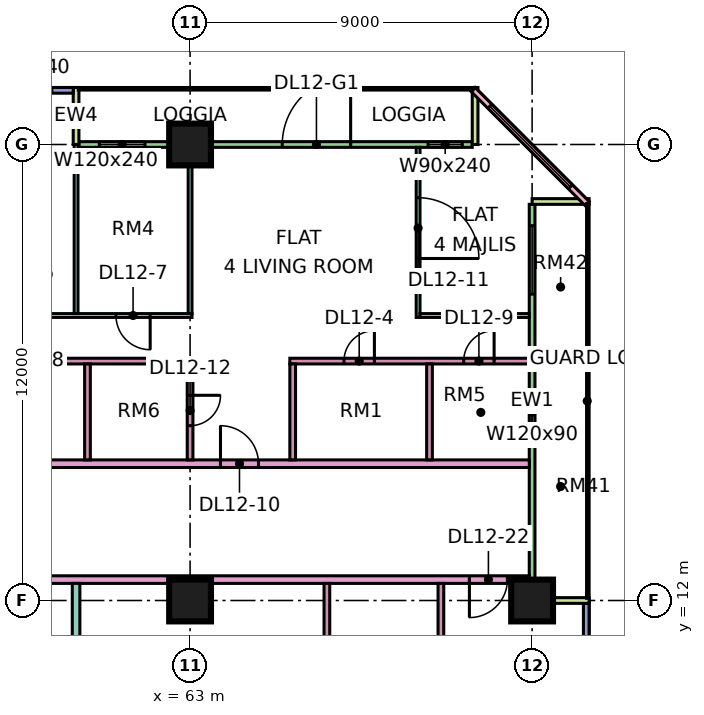
"""IFC4 building model, lengths in metres.
Left out: names, types, materials, properties, quantities, classifications, styles, units other than length and angle.
Written with IfcOpenShell. Run it as: python <this file> out.ifc"""

import sys

from ifc_helpers import new_model, si_unit, direction, frame, frame_2d, origin, origin_2d, place, context, subcontext, project, spatial, rectangle, extrude, element, fill, save


model = new_model("IFC4")
c1 = context("Model", 3, precision=1e-05, world=origin(), true_north=direction((0.0, 1.0)))
c2 = subcontext(c1, "Body", "Model", "MODEL_VIEW")
j1 = project(units=[si_unit("LENGTHUNIT", "METRE"), si_unit("PLANEANGLEUNIT", "RADIAN")], contexts=[c1])
p1 = place(None, origin())
s1 = spatial("IfcSite", under=j1, at=p1, CompositionType="ELEMENT")
p2 = place(p1, origin())
s2 = spatial("IfcBuilding", under=s1, at=p2, CompositionType="ELEMENT")
p3 = place(p2, frame((0.0, 0.0, 60.15)))
s3 = spatial("IfcBuildingStorey", under=s2, at=p3, CompositionType="ELEMENT", Elevation=60.15)
for number, where, z_axis, x_axis in (
    (1, (63.0, 12.0, 0.0), (0.0, 0.0, 1.0), (1.0, 0.0, 0.0)),
    (2, (63.0, 24.0, 0.0), (0.0, 0.0, 1.0), (1.0, 0.0, 0.0)),
    (3, (72.0, 12.0, 0.0), (0.0, 0.0, 1.0), (1.0, 0.0, 0.0)),
):
    element("IfcColumn", number, at=place(p3, frame(where, z_axis=z_axis, x_axis=x_axis)), inside=s3, PredefinedType="COLUMN", context=c2, shape_type="SweptSolid", body=[
        extrude(rectangle(XDim=1.1, YDim=1.1, at=origin_2d()), origin(), (0.0, 0.0, 1.0), 3.75),
    ])
p4 = place(p3, frame((70.425, 24.0, 0.0), z_axis=(0.0, 0.0, 1.0), x_axis=(-1.0, 0.0, 0.0)))
e4 = element("IfcWall", 4, at=p4, inside=s3, PredefinedType="SOLIDWALL", context=c2, shape_type="SweptSolid", body=[
    extrude(rectangle(XDim=10.35, YDim=0.15, at=frame_2d((5.175, 0.0))), origin(), (0.0, 0.0, 1.0), 3.35),
])
p5 = place(p4, frame((0.262, 0.0, 0.45)))
e5 = element("IfcOpeningElement", 5, at=p5, cuts=e4, PredefinedType="OPENING", context=c2, shape_type="SweptSolid", body=[
    extrude(rectangle(XDim=0.9, YDim=2.4, at=frame_2d((0.45, 1.2))), frame((0.0, 0.085, 0.0), z_axis=(0.0, -1.0, 0.0), x_axis=(1.0, 0.0, 0.0)), (0.0, 0.0, 1.0), 0.17),
])
p6 = place(p4, frame((3.2, 0.0, 0.0)))
e6 = element("IfcOpeningElement", 6, at=p6, cuts=e4, PredefinedType="OPENING", context=c2, shape_type="SweptSolid", body=[
    extrude(rectangle(XDim=1.8, YDim=2.4, at=frame_2d((0.9, 1.2))), frame((0.0, 0.085, 0.0), z_axis=(0.0, -1.0, 0.0), x_axis=(1.0, 0.0, 0.0)), (0.0, 0.0, 1.0), 0.17),
])
p7 = place(p4, frame((8.613, 0.0, 0.45)))
e7 = element("IfcOpeningElement", 7, at=p7, cuts=e4, PredefinedType="OPENING", context=c2, shape_type="SweptSolid", body=[
    extrude(rectangle(XDim=1.2, YDim=2.4, at=frame_2d((0.6, 1.2))), frame((0.0, 0.085, 0.0), z_axis=(0.0, -1.0, 0.0), x_axis=(1.0, 0.0, 0.0)), (0.0, 0.0, 1.0), 0.17),
])
for number, where, z_axis, x_axis in (
    (8, (70.5, 25.5, 0.0), (0.0, 0.0, 1.0), (0.0, -1.0, 0.0)),
    (9, (60.0, 25.5, 0.0), (0.0, 0.0, 1.0), (0.0, -1.0, 0.0)),
):
    element("IfcWall", number, at=place(p3, frame(where, z_axis=z_axis, x_axis=x_axis)), inside=s3, PredefinedType="SOLIDWALL", context=c2, shape_type="SweptSolid", body=[
        extrude(rectangle(XDim=1.5, YDim=0.15, at=frame_2d((0.75, 0.0))), origin(), (0.0, 0.0, 1.0), 3.35),
    ])
p8 = place(p3, frame((59.925, 25.425, 0.0), z_axis=(0.0, 0.0, 1.0), x_axis=(-1.0, 0.0, 0.0)))
e10 = element("IfcWall", 10, at=p8, inside=s3, PredefinedType="SOLIDWALL", context=c2, shape_type="SweptSolid", body=[
    extrude(rectangle(XDim=11.85, YDim=0.15, at=frame_2d((5.925, 0.0))), origin(), (0.0, 0.0, 1.0), 3.35),
])
p9 = place(p8, frame((0.562, 0.0, 0.45)))
e11 = element("IfcOpeningElement", 11, at=p9, cuts=e10, PredefinedType="OPENING", context=c2, shape_type="SweptSolid", body=[
    extrude(rectangle(XDim=1.8, YDim=2.4, at=frame_2d((0.9, 1.2))), frame((0.0, 0.085, 0.0), z_axis=(0.0, -1.0, 0.0), x_axis=(1.0, 0.0, 0.0)), (0.0, 0.0, 1.0), 0.17),
])
p10 = place(p8, frame((3.525, 0.0, 0.45)))
e12 = element("IfcOpeningElement", 12, at=p10, cuts=e10, PredefinedType="OPENING", context=c2, shape_type="SweptSolid", body=[
    extrude(rectangle(XDim=1.8, YDim=2.4, at=frame_2d((0.9, 1.2))), frame((0.0, 0.085, 0.0), z_axis=(0.0, -1.0, 0.0), x_axis=(1.0, 0.0, 0.0)), (0.0, 0.0, 1.0), 0.17),
])
p11 = place(p8, frame((6.488, 0.0, 0.45)))
e13 = element("IfcOpeningElement", 13, at=p11, cuts=e10, PredefinedType="OPENING", context=c2, shape_type="SweptSolid", body=[
    extrude(rectangle(XDim=4.8, YDim=2.4, at=frame_2d((2.4, 1.2))), frame((0.0, 0.085, 0.0), z_axis=(0.0, -1.0, 0.0), x_axis=(1.0, 0.0, 0.0)), (0.0, 0.0, 1.0), 0.17),
])
p12 = place(p3, frame((73.425, 1.5, 0.0), z_axis=(0.0, 0.0, 1.0), x_axis=(0.0, 1.0, 0.0)))
e14 = element("IfcWall", 14, at=p12, inside=s3, PredefinedType="SOLIDWALL", context=c2, shape_type="SweptSolid", body=[
    extrude(rectangle(XDim=10.425, YDim=0.15, at=frame_2d((5.212, 0.0))), origin(), (0.0, 0.0, 1.0), 3.35),
])
p13 = place(p12, frame((1.025, 0.0, 0.45)))
e15 = element("IfcOpeningElement", 15, at=p13, cuts=e14, PredefinedType="OPENING", context=c2, shape_type="SweptSolid", body=[
    extrude(rectangle(XDim=3.0, YDim=2.4, at=frame_2d((1.5, 1.2))), frame((0.0, 0.085, 0.0), z_axis=(0.0, -1.0, 0.0), x_axis=(1.0, 0.0, 0.0)), (0.0, 0.0, 1.0), 0.17),
])
p14 = place(p12, frame((6.238, 0.0, 0.45)))
e16 = element("IfcOpeningElement", 16, at=p14, cuts=e14, PredefinedType="OPENING", context=c2, shape_type="SweptSolid", body=[
    extrude(rectangle(XDim=3.0, YDim=2.4, at=frame_2d((1.5, 1.2))), frame((0.0, 0.085, 0.0), z_axis=(0.0, -1.0, 0.0), x_axis=(1.0, 0.0, 0.0)), (0.0, 0.0, 1.0), 0.17),
])
p15 = place(p3, frame((72.0, 12.075, 0.0), z_axis=(0.0, 0.0, 1.0), x_axis=(0.0, 1.0, 0.0)))
e17 = element("IfcWall", 17, at=p15, inside=s3, PredefinedType="SOLIDWALL", context=c2, shape_type="SweptSolid", body=[
    extrude(rectangle(XDim=10.35, YDim=0.15, at=frame_2d((5.175, 0.0))), origin(), (0.0, 0.0, 1.0), 3.35),
])
p16 = place(p15, frame((4.275, 0.0, 1.7)))
e18 = element("IfcOpeningElement", 18, at=p16, cuts=e17, PredefinedType="OPENING", context=c2, shape_type="SweptSolid", body=[
    extrude(rectangle(XDim=1.2, YDim=0.9, at=frame_2d((0.6, 0.45))), frame((0.0, 0.085, 0.0), z_axis=(0.0, -1.0, 0.0), x_axis=(1.0, 0.0, 0.0)), (0.0, 0.0, 1.0), 0.17),
])
p17 = place(p15, frame((7.988, 0.0, 0.45)))
e19 = element("IfcOpeningElement", 19, at=p17, cuts=e17, PredefinedType="OPENING", context=c2, shape_type="SweptSolid", body=[
    extrude(rectangle(XDim=1.8, YDim=2.4, at=frame_2d((0.9, 1.2))), frame((0.0, 0.085, 0.0), z_axis=(0.0, -1.0, 0.0), x_axis=(1.0, 0.0, 0.0)), (0.0, 0.0, 1.0), 0.17),
])
for number, where, z_axis, x_axis in (
    (20, (73.5, 12.0, 0.0), (0.0, 0.0, 1.0), (-1.0, 0.0, 0.0)),
    (21, (73.5, 22.5, 0.0), (0.0, 0.0, 1.0), (-1.0, 0.0, 0.0)),
):
    element("IfcWall", number, at=place(p3, frame(where, z_axis=z_axis, x_axis=x_axis)), inside=s3, PredefinedType="SOLIDWALL", context=c2, shape_type="SweptSolid", body=[
        extrude(rectangle(XDim=1.5, YDim=0.15, at=frame_2d((0.75, 0.0))), origin(), (0.0, 0.0, 1.0), 3.35),
    ])
p18 = place(p3, frame((73.447, 22.447, 0.0), z_axis=(0.0, 0.0, 1.0), x_axis=(-0.707106781187, 0.707106781187, 0.0)))
e22 = element("IfcWall", 22, at=p18, inside=s3, PredefinedType="SOLIDWALL", context=c2, shape_type="SweptSolid", body=[
    extrude(rectangle(XDim=4.243, YDim=0.15, at=frame_2d((2.121, 0.0))), origin(), (0.0, 0.0, 1.0), 3.35),
])
p19 = place(p18, frame((0.621, 0.0, 0.45)))
e23 = element("IfcOpeningElement", 23, at=p19, cuts=e22, PredefinedType="OPENING", context=c2, shape_type="SweptSolid", body=[
    extrude(rectangle(XDim=3.0, YDim=2.4, at=frame_2d((1.5, 1.2))), frame((0.0, 0.085, 0.0), z_axis=(0.0, -1.0, 0.0), x_axis=(1.0, 0.0, 0.0)), (0.0, 0.0, 1.0), 0.17),
])
p20 = place(p3, frame((40.65, 12.55, 0.0), z_axis=(0.0, 0.0, 1.0), x_axis=(1.0, 0.0, 0.0)))
e24 = element("IfcWall", 24, at=p20, inside=s3, PredefinedType="PARTITIONING", context=c2, shape_type="SweptSolid", body=[
    extrude(rectangle(XDim=31.276, YDim=0.2, at=frame_2d((15.638, 0.0))), origin(), (0.0, 0.0, 1.0), 3.35),
])
p21 = place(p20, frame((8.4, 0.0, 0.0)))
e25 = element("IfcOpeningElement", 25, at=p21, cuts=e24, PredefinedType="OPENING", context=c2, shape_type="SweptSolid", body=[
    extrude(rectangle(XDim=1.0, YDim=2.1, at=frame_2d((0.5, 1.05))), frame((0.0, 0.11, 0.0), z_axis=(0.0, -1.0, 0.0), x_axis=(1.0, 0.0, 0.0)), (0.0, 0.0, 1.0), 0.22),
])
p22 = place(p20, frame((29.7, 0.0, 0.0)))
e26 = element("IfcOpeningElement", 26, at=p22, cuts=e24, PredefinedType="OPENING", context=c2, shape_type="SweptSolid", body=[
    extrude(rectangle(XDim=1.0, YDim=2.1, at=frame_2d((0.5, 1.05))), frame((0.0, 0.11, 0.0), z_axis=(0.0, -1.0, 0.0), x_axis=(1.0, 0.0, 0.0)), (0.0, 0.0, 1.0), 0.22),
])
p23 = place(p20, frame((1.05, 0.0, 0.0)))
e27 = element("IfcOpeningElement", 27, at=p23, cuts=e24, PredefinedType="OPENING", context=c2, shape_type="SweptSolid", body=[
    extrude(rectangle(XDim=1.0, YDim=2.1, at=frame_2d((0.5, 1.05))), frame((0.0, 0.11, 0.0), z_axis=(0.0, -1.0, 0.0), x_axis=(1.0, 0.0, 0.0)), (0.0, 0.0, 1.0), 0.22),
])
p24 = place(p3, frame((51.225, 15.6, 0.0), z_axis=(0.0, 0.0, 1.0), x_axis=(1.0, 0.0, 0.0)))
e28 = element("IfcWall", 28, at=p24, inside=s3, PredefinedType="PARTITIONING", context=c2, shape_type="SweptSolid", body=[
    extrude(rectangle(XDim=20.701, YDim=0.2, at=frame_2d((10.351, 0.0))), origin(), (0.0, 0.0, 1.0), 3.35),
])
p25 = place(p24, frame((12.575, 0.0, 0.0)))
e29 = element("IfcOpeningElement", 29, at=p25, cuts=e28, PredefinedType="OPENING", context=c2, shape_type="SweptSolid", body=[
    extrude(rectangle(XDim=1.0, YDim=2.1, at=frame_2d((0.5, 1.05))), frame((0.0, 0.11, 0.0), z_axis=(0.0, -1.0, 0.0), x_axis=(1.0, 0.0, 0.0)), (0.0, 0.0, 1.0), 0.22),
])
p26 = place(p24, frame((0.875, 0.0, 0.0)))
e30 = element("IfcOpeningElement", 30, at=p26, cuts=e28, PredefinedType="OPENING", context=c2, shape_type="SweptSolid", body=[
    extrude(rectangle(XDim=1.0, YDim=2.1, at=frame_2d((0.5, 1.05))), frame((0.0, 0.11, 0.0), z_axis=(0.0, -1.0, 0.0), x_axis=(1.0, 0.0, 0.0)), (0.0, 0.0, 1.0), 0.22),
])
p27 = place(p3, frame((54.1, 18.3, 0.0), z_axis=(0.0, 0.0, 1.0), x_axis=(1.0, 0.0, 0.0)))
e31 = element("IfcWall", 31, at=p27, inside=s3, PredefinedType="PARTITIONING", context=c2, shape_type="SweptSolid", body=[
    extrude(rectangle(XDim=8.975, YDim=0.15, at=frame_2d((4.487, 0.0))), origin(), (0.0, 0.0, 1.0), 3.35),
])
p28 = place(p27, frame((2.6, 0.0, 0.0)))
e32 = element("IfcOpeningElement", 32, at=p28, cuts=e31, PredefinedType="OPENING", context=c2, shape_type="SweptSolid", body=[
    extrude(rectangle(XDim=0.9, YDim=2.1, at=frame_2d((0.45, 1.05))), frame((0.0, 0.085, 0.0), z_axis=(0.0, -1.0, 0.0), x_axis=(1.0, 0.0, 0.0)), (0.0, 0.0, 1.0), 0.17),
])
p29 = place(p3, frame((54.1, 19.5, 0.0), z_axis=(0.0, 0.0, 1.0), x_axis=(1.0, 0.0, 0.0)))
e33 = element("IfcWall", 33, at=p29, inside=s3, PredefinedType="PARTITIONING", context=c2, shape_type="SweptSolid", body=[
    extrude(rectangle(XDim=8.95, YDim=0.1, at=frame_2d((4.475, 0.0))), origin(), (0.0, 0.0, 1.0), 3.35),
])
p30 = place(p29, frame((0.95, 0.0, 0.0)))
e34 = element("IfcOpeningElement", 34, at=p30, cuts=e33, PredefinedType="OPENING", context=c2, shape_type="SweptSolid", body=[
    extrude(rectangle(XDim=0.9, YDim=2.1, at=frame_2d((0.45, 1.05))), frame((0.0, 0.06, 0.0), z_axis=(0.0, -1.0, 0.0), x_axis=(1.0, 0.0, 0.0)), (0.0, 0.0, 1.0), 0.12),
])
p31 = place(p29, frame((3.95, 0.0, 0.0)))
e35 = element("IfcOpeningElement", 35, at=p31, cuts=e33, PredefinedType="OPENING", context=c2, shape_type="SweptSolid", body=[
    extrude(rectangle(XDim=0.9, YDim=2.1, at=frame_2d((0.45, 1.05))), frame((0.0, 0.06, 0.0), z_axis=(0.0, -1.0, 0.0), x_axis=(1.0, 0.0, 0.0)), (0.0, 0.0, 1.0), 0.12),
])
p32 = place(p29, frame((6.95, 0.0, 0.0)))
e36 = element("IfcOpeningElement", 36, at=p32, cuts=e33, PredefinedType="OPENING", context=c2, shape_type="SweptSolid", body=[
    extrude(rectangle(XDim=0.9, YDim=2.1, at=frame_2d((0.45, 1.05))), frame((0.0, 0.06, 0.0), z_axis=(0.0, -1.0, 0.0), x_axis=(1.0, 0.0, 0.0)), (0.0, 0.0, 1.0), 0.12),
])
p33 = place(p3, frame((60.0, 0.0, 0.0), z_axis=(0.0, 0.0, 1.0), x_axis=(0.0, 1.0, 0.0)))
e37 = element("IfcWall", 37, at=p33, inside=s3, PredefinedType="PARTITIONING", context=c2, shape_type="SweptSolid", body=[
    extrude(rectangle(XDim=12.45, YDim=0.2, at=frame_2d((6.225, 0.0))), origin(), (0.0, 0.0, 1.0), 3.35),
])
p34 = place(p3, frame((60.0, 19.55, 0.0), z_axis=(0.0, 0.0, 1.0), x_axis=(0.0, 1.0, 0.0)))
e38 = element("IfcWall", 38, at=p34, inside=s3, PredefinedType="PARTITIONING", context=c2, shape_type="SweptSolid", body=[
    extrude(rectangle(XDim=4.45, YDim=0.1, at=frame_2d((2.225, 0.0))), origin(), (0.0, 0.0, 1.0), 3.35),
])
p35 = place(p3, frame((60.3, 15.7, 0.0), z_axis=(0.0, 0.0, 1.0), x_axis=(0.0, 1.0, 0.0)))
e39 = element("IfcWall", 39, at=p35, inside=s3, PredefinedType="PARTITIONING", context=c2, shape_type="SweptSolid", body=[
    extrude(rectangle(XDim=2.525, YDim=0.15, at=frame_2d((1.263, 0.0))), origin(), (0.0, 0.0, 1.0), 3.35),
])
p36 = place(p3, frame((63.0, 15.7, 0.0), z_axis=(0.0, 0.0, 1.0), x_axis=(0.0, 1.0, 0.0)))
e40 = element("IfcWall", 40, at=p36, inside=s3, PredefinedType="PARTITIONING", context=c2, shape_type="SweptSolid", body=[
    extrude(rectangle(XDim=2.525, YDim=0.15, at=frame_2d((1.263, 0.0))), origin(), (0.0, 0.0, 1.0), 3.35),
])
p37 = place(p36, frame((0.9, 0.0, 0.0)))
e41 = element("IfcOpeningElement", 41, at=p37, cuts=e40, PredefinedType="OPENING", context=c2, shape_type="SweptSolid", body=[
    extrude(rectangle(XDim=0.8, YDim=2.1, at=frame_2d((0.4, 1.05))), frame((0.0, 0.085, 0.0), z_axis=(0.0, -1.0, 0.0), x_axis=(1.0, 0.0, 0.0)), (0.0, 0.0, 1.0), 0.17),
])
p38 = place(p3, frame((63.0, 19.55, 0.0), z_axis=(0.0, 0.0, 1.0), x_axis=(0.0, 1.0, 0.0)))
e42 = element("IfcWall", 42, at=p38, inside=s3, PredefinedType="PARTITIONING", context=c2, shape_type="SweptSolid", body=[
    extrude(rectangle(XDim=4.376, YDim=0.1, at=frame_2d((2.188, 0.0))), origin(), (0.0, 0.0, 1.0), 3.35),
])
p39 = place(p3, frame((65.625, 18.3, 0.0), z_axis=(0.0, 0.0, 1.0), x_axis=(1.0, 0.0, 0.0)))
e43 = element("IfcWall", 43, at=p39, inside=s3, PredefinedType="PARTITIONING", context=c2, shape_type="SweptSolid", body=[
    extrude(rectangle(XDim=6.301, YDim=0.15, at=frame_2d((3.15, 0.0))), origin(), (0.0, 0.0, 1.0), 3.35),
])
p40 = place(p39, frame((1.425, 0.0, 0.0)))
e44 = element("IfcOpeningElement", 44, at=p40, cuts=e43, PredefinedType="OPENING", context=c2, shape_type="SweptSolid", body=[
    extrude(rectangle(XDim=0.8, YDim=2.1, at=frame_2d((0.4, 1.05))), frame((0.0, 0.085, 0.0), z_axis=(0.0, -1.0, 0.0), x_axis=(1.0, 0.0, 0.0)), (0.0, 0.0, 1.0), 0.17),
])
p41 = place(p39, frame((4.575, 0.0, 0.0)))
e45 = element("IfcOpeningElement", 45, at=p41, cuts=e43, PredefinedType="OPENING", context=c2, shape_type="SweptSolid", body=[
    extrude(rectangle(XDim=0.8, YDim=2.1, at=frame_2d((0.4, 1.05))), frame((0.0, 0.085, 0.0), z_axis=(0.0, -1.0, 0.0), x_axis=(1.0, 0.0, 0.0)), (0.0, 0.0, 1.0), 0.17),
])
p42 = place(p3, frame((65.7, 15.7, 0.0), z_axis=(0.0, 0.0, 1.0), x_axis=(0.0, 1.0, 0.0)))
e46 = element("IfcWall", 46, at=p42, inside=s3, PredefinedType="PARTITIONING", context=c2, shape_type="SweptSolid", body=[
    extrude(rectangle(XDim=2.525, YDim=0.15, at=frame_2d((1.263, 0.0))), origin(), (0.0, 0.0, 1.0), 3.35),
])
p43 = place(p3, frame((66.6, 7.825, 0.0), z_axis=(0.0, 0.0, 1.0), x_axis=(0.0, 1.0, 0.0)))
e47 = element("IfcWall", 47, at=p43, inside=s3, PredefinedType="PARTITIONING", context=c2, shape_type="SweptSolid", body=[
    extrude(rectangle(XDim=4.625, YDim=0.15, at=frame_2d((2.312, 0.0))), origin(), (0.0, 0.0, 1.0), 3.35),
])
p44 = place(p3, frame((69.0, 19.45, 0.0), z_axis=(0.0, 0.0, 1.0), x_axis=(0.0, 1.0, 0.0)))
e48 = element("IfcWall", 48, at=p44, inside=s3, PredefinedType="PARTITIONING", context=c2, shape_type="SweptSolid", body=[
    extrude(rectangle(XDim=4.476, YDim=0.1, at=frame_2d((2.238, 0.0))), origin(), (0.0, 0.0, 1.0), 3.35),
])
p45 = place(p44, frame((1.55, 0.0, 0.0)))
e49 = element("IfcOpeningElement", 49, at=p45, cuts=e48, PredefinedType="OPENING", context=c2, shape_type="SweptSolid", body=[
    extrude(rectangle(XDim=1.6, YDim=2.1, at=frame_2d((0.8, 1.05))), frame((0.0, 0.06, 0.0), z_axis=(0.0, -1.0, 0.0), x_axis=(1.0, 0.0, 0.0)), (0.0, 0.0, 1.0), 0.12),
])
p46 = place(p3, frame((69.05, 19.5, 0.0), z_axis=(0.0, 0.0, 1.0), x_axis=(1.0, 0.0, 0.0)))
e50 = element("IfcWall", 50, at=p46, inside=s3, PredefinedType="PARTITIONING", context=c2, shape_type="SweptSolid", body=[
    extrude(rectangle(XDim=2.876, YDim=0.1, at=frame_2d((1.438, 0.0))), origin(), (0.0, 0.0, 1.0), 3.35),
])
p47 = place(p3, frame((69.3, 15.7, 0.0), z_axis=(0.0, 0.0, 1.0), x_axis=(0.0, 1.0, 0.0)))
e51 = element("IfcWall", 51, at=p47, inside=s3, PredefinedType="PARTITIONING", context=c2, shape_type="SweptSolid", body=[
    extrude(rectangle(XDim=2.525, YDim=0.15, at=frame_2d((1.263, 0.0))), origin(), (0.0, 0.0, 1.0), 3.35),
])
p48 = place(p3, frame((69.6, 7.825, 0.0), z_axis=(0.0, 0.0, 1.0), x_axis=(0.0, 1.0, 0.0)))
e52 = element("IfcWall", 52, at=p48, inside=s3, PredefinedType="PARTITIONING", context=c2, shape_type="SweptSolid", body=[
    extrude(rectangle(XDim=4.625, YDim=0.15, at=frame_2d((2.312, 0.0))), origin(), (0.0, 0.0, 1.0), 3.35),
])
p49 = place(p5, origin())
e53 = element("IfcWindow", 53, at=p49, inside=s3, PartitioningType="SINGLE_PANEL", PredefinedType="WINDOW", context=c2, shape_type="SweptSolid", body=[
    extrude(rectangle(XDim=0.9, YDim=2.4, at=frame_2d((0.45, 1.2))), frame((0.0, 0.03, 0.0), z_axis=(0.0, -1.0, 0.0), x_axis=(1.0, 0.0, 0.0)), (0.0, 0.0, 1.0), 0.06),
])
fill(e5, e53)
p50 = place(p6, frame((1.8, 0.0, 0.0), z_axis=(0.0, 0.0, 1.0), x_axis=(-1.0, 0.0, 0.0)))
e54 = element("IfcDoor", 54, at=p50, inside=s3, OperationType="DOUBLE_DOOR_SINGLE_SWING", PredefinedType="DOOR", context=c2, shape_type="SweptSolid", body=[
    extrude(rectangle(XDim=1.8, YDim=2.4, at=frame_2d((0.9, 1.2))), frame((0.0, 0.025, 0.0), z_axis=(0.0, -1.0, 0.0), x_axis=(1.0, 0.0, 0.0)), (0.0, 0.0, 1.0), 0.05),
])
fill(e6, e54)
p51 = place(p7, origin())
e55 = element("IfcWindow", 55, at=p51, inside=s3, PartitioningType="SINGLE_PANEL", PredefinedType="WINDOW", context=c2, shape_type="SweptSolid", body=[
    extrude(rectangle(XDim=1.2, YDim=2.4, at=frame_2d((0.6, 1.2))), frame((0.0, 0.03, 0.0), z_axis=(0.0, -1.0, 0.0), x_axis=(1.0, 0.0, 0.0)), (0.0, 0.0, 1.0), 0.06),
])
fill(e7, e55)
p52 = place(p16, origin())
e56 = element("IfcWindow", 56, at=p52, inside=s3, PartitioningType="SINGLE_PANEL", PredefinedType="WINDOW", context=c2, shape_type="SweptSolid", body=[
    extrude(rectangle(XDim=1.2, YDim=0.9, at=frame_2d((0.6, 0.45))), frame((0.0, 0.03, 0.0), z_axis=(0.0, -1.0, 0.0), x_axis=(1.0, 0.0, 0.0)), (0.0, 0.0, 1.0), 0.06),
])
fill(e18, e56)
p53 = place(p17, origin())
e57 = element("IfcWindow", 57, at=p53, inside=s3, PartitioningType="SINGLE_PANEL", PredefinedType="WINDOW", context=c2, shape_type="SweptSolid", body=[
    extrude(rectangle(XDim=1.8, YDim=2.4, at=frame_2d((0.9, 1.2))), frame((0.0, 0.03, 0.0), z_axis=(0.0, -1.0, 0.0), x_axis=(1.0, 0.0, 0.0)), (0.0, 0.0, 1.0), 0.06),
])
fill(e19, e57)
p54 = place(p19, origin())
e58 = element("IfcWindow", 58, at=p54, inside=s3, PartitioningType="SINGLE_PANEL", PredefinedType="WINDOW", context=c2, shape_type="SweptSolid", body=[
    extrude(rectangle(XDim=3.0, YDim=2.4, at=frame_2d((1.5, 1.2))), frame((0.0, 0.03, 0.0), z_axis=(0.0, -1.0, 0.0), x_axis=(1.0, 0.0, 0.0)), (0.0, 0.0, 1.0), 0.06),
])
fill(e23, e58)
p55 = place(p40, frame((0.8, 0.0, 0.0), z_axis=(0.0, 0.0, 1.0), x_axis=(-1.0, 0.0, 0.0)))
e59 = element("IfcDoor", 59, at=p55, inside=s3, OperationType="SINGLE_SWING_RIGHT", PredefinedType="DOOR", context=c2, shape_type="SweptSolid", body=[
    extrude(rectangle(XDim=0.8, YDim=2.1, at=frame_2d((0.4, 1.05))), frame((0.0, 0.025, 0.0), z_axis=(0.0, -1.0, 0.0), x_axis=(1.0, 0.0, 0.0)), (0.0, 0.0, 1.0), 0.05),
])
fill(e44, e59)
p56 = place(p32, origin())
e60 = element("IfcDoor", 60, at=p56, inside=s3, OperationType="SINGLE_SWING_RIGHT", PredefinedType="DOOR", context=c2, shape_type="SweptSolid", body=[
    extrude(rectangle(XDim=0.9, YDim=2.1, at=frame_2d((0.45, 1.05))), frame((0.0, 0.025, 0.0), z_axis=(0.0, -1.0, 0.0), x_axis=(1.0, 0.0, 0.0)), (0.0, 0.0, 1.0), 0.05),
])
fill(e36, e60)
p57 = place(p41, frame((0.8, 0.0, 0.0), z_axis=(0.0, 0.0, 1.0), x_axis=(-1.0, 0.0, 0.0)))
e61 = element("IfcDoor", 61, at=p57, inside=s3, OperationType="SINGLE_SWING_RIGHT", PredefinedType="DOOR", context=c2, shape_type="SweptSolid", body=[
    extrude(rectangle(XDim=0.8, YDim=2.1, at=frame_2d((0.4, 1.05))), frame((0.0, 0.025, 0.0), z_axis=(0.0, -1.0, 0.0), x_axis=(1.0, 0.0, 0.0)), (0.0, 0.0, 1.0), 0.05),
])
fill(e45, e61)
p58 = place(p25, origin())
e62 = element("IfcDoor", 62, at=p58, inside=s3, OperationType="SINGLE_SWING_LEFT", PredefinedType="DOOR", context=c2, shape_type="SweptSolid", body=[
    extrude(rectangle(XDim=1.0, YDim=2.1, at=frame_2d((0.5, 1.05))), frame((0.0, 0.025, 0.0), z_axis=(0.0, -1.0, 0.0), x_axis=(1.0, 0.0, 0.0)), (0.0, 0.0, 1.0), 0.05),
])
fill(e29, e62)
p59 = place(p45, frame((1.6, 0.0, 0.0), z_axis=(0.0, 0.0, 1.0), x_axis=(-1.0, 0.0, 0.0)))
e63 = element("IfcDoor", 63, at=p59, inside=s3, OperationType="DOUBLE_DOOR_SINGLE_SWING", PredefinedType="DOOR", context=c2, shape_type="SweptSolid", body=[
    extrude(rectangle(XDim=1.6, YDim=2.1, at=frame_2d((0.8, 1.05))), frame((0.0, 0.025, 0.0), z_axis=(0.0, -1.0, 0.0), x_axis=(1.0, 0.0, 0.0)), (0.0, 0.0, 1.0), 0.05),
])
fill(e49, e63)
p60 = place(p37, origin())
e64 = element("IfcDoor", 64, at=p60, inside=s3, OperationType="SINGLE_SWING_RIGHT", PredefinedType="DOOR", context=c2, shape_type="SweptSolid", body=[
    extrude(rectangle(XDim=0.8, YDim=2.1, at=frame_2d((0.4, 1.05))), frame((0.0, 0.025, 0.0), z_axis=(0.0, -1.0, 0.0), x_axis=(1.0, 0.0, 0.0)), (0.0, 0.0, 1.0), 0.05),
])
fill(e41, e64)
p61 = place(p22, frame((1.0, 0.0, 0.0), z_axis=(0.0, 0.0, 1.0), x_axis=(-1.0, 0.0, 0.0)))
e65 = element("IfcDoor", 65, at=p61, inside=s3, OperationType="SINGLE_SWING_LEFT", PredefinedType="DOOR", context=c2, shape_type="SweptSolid", body=[
    extrude(rectangle(XDim=1.0, YDim=2.1, at=frame_2d((0.5, 1.05))), frame((0.0, 0.025, 0.0), z_axis=(0.0, -1.0, 0.0), x_axis=(1.0, 0.0, 0.0)), (0.0, 0.0, 1.0), 0.05),
])
fill(e26, e65)
save(model, sys.argv[1])
